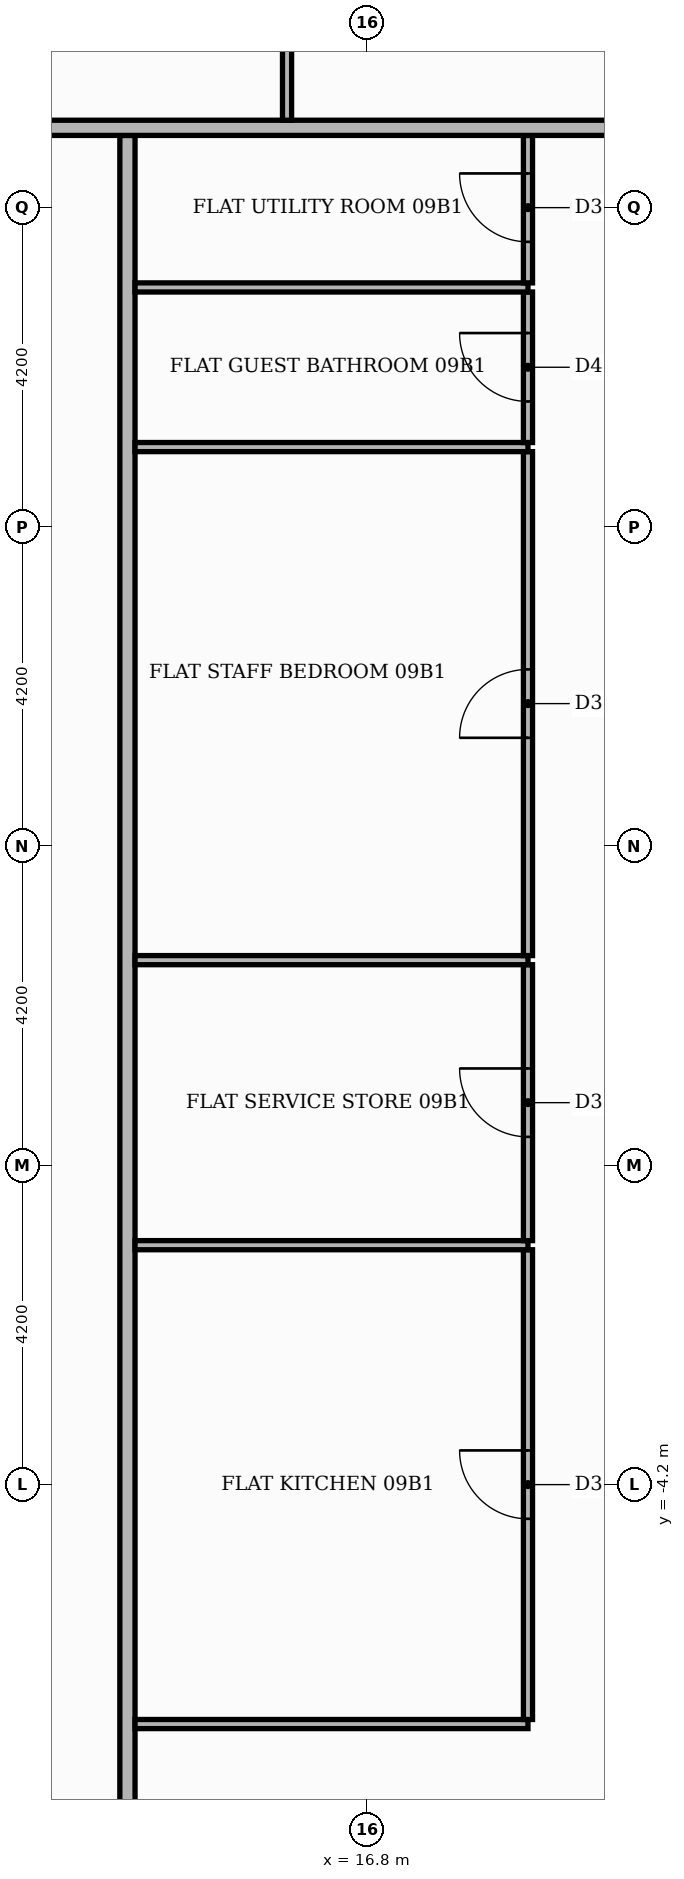
"""IFC4 building model, lengths in metres.
Left out: names, types, materials, properties, quantities, classifications, styles, units other than length and angle.
Written with IfcOpenShell. Run it as: python <this file> out.ifc"""

import sys

from ifc_helpers import new_model, si_unit, direction, frame, frame_2d, origin, place, context, subcontext, project, spatial, rectangle, extrude, element, fill, save


model = new_model("IFC4")
c1 = context("Model", 3, precision=1e-05, world=origin(), true_north=direction((0.0, 1.0)))
c2 = subcontext(c1, "Body", "Model", "MODEL_VIEW")
j1 = project(units=[si_unit("LENGTHUNIT", "METRE"), si_unit("PLANEANGLEUNIT", "RADIAN")], contexts=[c1])
p1 = place(None, origin())
s1 = spatial("IfcSite", under=j1, at=p1, CompositionType="ELEMENT")
p2 = place(p1, origin())
s2 = spatial("IfcBuilding", under=s1, at=p2, CompositionType="ELEMENT")
p3 = place(p2, frame((0.0, 0.0, 42.6)))
s3 = spatial("IfcBuildingStorey", under=s2, at=p3, CompositionType="ELEMENT", Elevation=42.6)
p4 = place(p3, frame((13.65, -13.55, 0.0), z_axis=(0.0, 0.0, 1.0), x_axis=(0.0, 1.0, 0.0)))
e1 = element("IfcWall", 1, at=p4, inside=s3, PredefinedType="PARTITIONING", context=c2, shape_type="SweptSolid", body=[
    extrude(rectangle(XDim=27.1, YDim=0.2, at=frame_2d((13.55, 0.0))), origin(), (0.0, 0.0, 1.0), 3.48),
])
p5 = place(p4, frame((2.5, 0.0, 0.0)))
e2 = element("IfcOpeningElement", 2, at=p5, cuts=e1, PredefinedType="OPENING", context=c2, shape_type="SweptSolid", body=[
    extrude(rectangle(XDim=1.1, YDim=2.4, at=frame_2d((0.55, 1.2))), frame((0.0, 0.11, 0.0), z_axis=(0.0, -1.0, 0.0), x_axis=(1.0, 0.0, 0.0)), (0.0, 0.0, 1.0), 0.22),
])
p6 = place(p3, frame((13.75, -7.35, 0.0), z_axis=(0.0, 0.0, 1.0), x_axis=(1.0, 0.0, 0.0)))
e3 = element("IfcWall", 3, at=p6, inside=s3, PredefinedType="PARTITIONING", context=c2, shape_type="SweptSolid", body=[
    extrude(rectangle(XDim=5.17, YDim=0.12, at=frame_2d((2.585, 0.0))), origin(), (0.0, 0.0, 1.0), 3.48),
])
p7 = place(p3, frame((18.92, -7.29, 0.0), z_axis=(0.0, 0.0, 1.0), x_axis=(0.0, 1.0, 0.0)))
e4 = element("IfcWall", 4, at=p7, inside=s3, PredefinedType="PARTITIONING", context=c2, shape_type="SweptSolid", body=[
    extrude(rectangle(XDim=6.18, YDim=0.12, at=frame_2d((3.09, 0.0))), origin(), (0.0, 0.0, 1.0), 3.48),
])
p8 = place(p7, frame((2.64, 0.0, 0.0)))
e5 = element("IfcOpeningElement", 5, at=p8, cuts=e4, PredefinedType="OPENING", context=c2, shape_type="SweptSolid", body=[
    extrude(rectangle(XDim=0.9, YDim=2.1, at=frame_2d((0.45, 1.05))), frame((0.0, 0.07, 0.0), z_axis=(0.0, -1.0, 0.0), x_axis=(1.0, 0.0, 0.0)), (0.0, 0.0, 1.0), 0.14),
])
p9 = place(p3, frame((13.75, -1.05, 0.0), z_axis=(0.0, 0.0, 1.0), x_axis=(1.0, 0.0, 0.0)))
e6 = element("IfcWall", 6, at=p9, inside=s3, PredefinedType="PARTITIONING", context=c2, shape_type="SweptSolid", body=[
    extrude(rectangle(XDim=5.17, YDim=0.12, at=frame_2d((2.585, 0.0))), origin(), (0.0, 0.0, 1.0), 3.48),
])
p10 = place(p3, frame((18.92, -0.99, 0.0), z_axis=(0.0, 0.0, 1.0), x_axis=(0.0, 1.0, 0.0)))
e7 = element("IfcWall", 7, at=p10, inside=s3, PredefinedType="PARTITIONING", context=c2, shape_type="SweptSolid", body=[
    extrude(rectangle(XDim=3.63, YDim=0.12, at=frame_2d((1.815, 0.0))), origin(), (0.0, 0.0, 1.0), 3.48),
])
p11 = place(p10, frame((1.365, 0.0, 0.0)))
e8 = element("IfcOpeningElement", 8, at=p11, cuts=e7, PredefinedType="OPENING", context=c2, shape_type="SweptSolid", body=[
    extrude(rectangle(XDim=0.9, YDim=2.1, at=frame_2d((0.45, 1.05))), frame((0.0, 0.07, 0.0), z_axis=(0.0, -1.0, 0.0), x_axis=(1.0, 0.0, 0.0)), (0.0, 0.0, 1.0), 0.14),
])
p12 = place(p3, frame((13.75, 2.7, 0.0), z_axis=(0.0, 0.0, 1.0), x_axis=(1.0, 0.0, 0.0)))
e9 = element("IfcWall", 9, at=p12, inside=s3, PredefinedType="PARTITIONING", context=c2, shape_type="SweptSolid", body=[
    extrude(rectangle(XDim=5.17, YDim=0.12, at=frame_2d((2.585, 0.0))), origin(), (0.0, 0.0, 1.0), 3.48),
])
p13 = place(p3, frame((18.92, 2.76, 0.0), z_axis=(0.0, 0.0, 1.0), x_axis=(0.0, 1.0, 0.0)))
e10 = element("IfcWall", 10, at=p13, inside=s3, PredefinedType="PARTITIONING", context=c2, shape_type="SweptSolid", body=[
    extrude(rectangle(XDim=6.63, YDim=0.12, at=frame_2d((3.315, 0.0))), origin(), (0.0, 0.0, 1.0), 3.48),
])
p14 = place(p13, frame((2.865, 0.0, 0.0)))
e11 = element("IfcOpeningElement", 11, at=p14, cuts=e10, PredefinedType="OPENING", context=c2, shape_type="SweptSolid", body=[
    extrude(rectangle(XDim=0.9, YDim=2.1, at=frame_2d((0.45, 1.05))), frame((0.0, 0.07, 0.0), z_axis=(0.0, -1.0, 0.0), x_axis=(1.0, 0.0, 0.0)), (0.0, 0.0, 1.0), 0.14),
])
p15 = place(p3, frame((13.75, 9.45, 0.0), z_axis=(0.0, 0.0, 1.0), x_axis=(1.0, 0.0, 0.0)))
e12 = element("IfcWall", 12, at=p15, inside=s3, PredefinedType="PARTITIONING", context=c2, shape_type="SweptSolid", body=[
    extrude(rectangle(XDim=5.17, YDim=0.12, at=frame_2d((2.585, 0.0))), origin(), (0.0, 0.0, 1.0), 3.48),
])
p16 = place(p3, frame((18.92, 9.51, 0.0), z_axis=(0.0, 0.0, 1.0), x_axis=(0.0, 1.0, 0.0)))
e13 = element("IfcWall", 13, at=p16, inside=s3, PredefinedType="PARTITIONING", context=c2, shape_type="SweptSolid", body=[
    extrude(rectangle(XDim=1.98, YDim=0.12, at=frame_2d((0.99, 0.0))), origin(), (0.0, 0.0, 1.0), 3.48),
])
p17 = place(p16, frame((0.54, 0.0, 0.0)))
e14 = element("IfcOpeningElement", 14, at=p17, cuts=e13, PredefinedType="OPENING", context=c2, shape_type="SweptSolid", body=[
    extrude(rectangle(XDim=0.9, YDim=2.1, at=frame_2d((0.45, 1.05))), frame((0.0, 0.07, 0.0), z_axis=(0.0, -1.0, 0.0), x_axis=(1.0, 0.0, 0.0)), (0.0, 0.0, 1.0), 0.14),
])
p18 = place(p3, frame((13.75, 11.55, 0.0), z_axis=(0.0, 0.0, 1.0), x_axis=(1.0, 0.0, 0.0)))
e15 = element("IfcWall", 15, at=p18, inside=s3, PredefinedType="PARTITIONING", context=c2, shape_type="SweptSolid", body=[
    extrude(rectangle(XDim=5.17, YDim=0.12, at=frame_2d((2.585, 0.0))), origin(), (0.0, 0.0, 1.0), 3.48),
])
p19 = place(p3, frame((18.92, 11.61, 0.0), z_axis=(0.0, 0.0, 1.0), x_axis=(0.0, 1.0, 0.0)))
e16 = element("IfcWall", 16, at=p19, inside=s3, PredefinedType="PARTITIONING", context=c2, shape_type="SweptSolid", body=[
    extrude(rectangle(XDim=1.94, YDim=0.12, at=frame_2d((0.97, 0.0))), origin(), (0.0, 0.0, 1.0), 3.48),
])
p20 = place(p19, frame((0.54, 0.0, 0.0)))
e17 = element("IfcOpeningElement", 17, at=p20, cuts=e16, PredefinedType="OPENING", context=c2, shape_type="SweptSolid", body=[
    extrude(rectangle(XDim=0.9, YDim=2.1, at=frame_2d((0.45, 1.05))), frame((0.0, 0.07, 0.0), z_axis=(0.0, -1.0, 0.0), x_axis=(1.0, 0.0, 0.0)), (0.0, 0.0, 1.0), 0.14),
])
p21 = place(p3, frame((-13.65, 13.65, 0.0), z_axis=(0.0, 0.0, 1.0), x_axis=(1.0, 0.0, 0.0)))
e18 = element("IfcWall", 18, at=p21, inside=s3, PredefinedType="PARTITIONING", context=c2, shape_type="SweptSolid", body=[
    extrude(rectangle(XDim=39.07, YDim=0.2, at=frame_2d((19.535, 0.0))), origin(), (0.0, 0.0, 1.0), 3.48),
])
p22 = place(p21, frame((24.65, 0.0, 0.0)))
e19 = element("IfcOpeningElement", 19, at=p22, cuts=e18, PredefinedType="OPENING", context=c2, shape_type="SweptSolid", body=[
    extrude(rectangle(XDim=1.1, YDim=2.4, at=frame_2d((0.55, 1.2))), frame((0.0, 0.11, 0.0), z_axis=(0.0, -1.0, 0.0), x_axis=(1.0, 0.0, 0.0)), (0.0, 0.0, 1.0), 0.22),
])
p23 = place(p21, frame((14.15, 0.0, 0.0)))
e20 = element("IfcOpeningElement", 20, at=p23, cuts=e18, PredefinedType="OPENING", context=c2, shape_type="SweptSolid", body=[
    extrude(rectangle(XDim=1.1, YDim=2.4, at=frame_2d((0.55, 1.2))), frame((0.0, 0.11, 0.0), z_axis=(0.0, -1.0, 0.0), x_axis=(1.0, 0.0, 0.0)), (0.0, 0.0, 1.0), 0.22),
])
p24 = place(p3, frame((15.75, 13.75, 0.0), z_axis=(0.0, 0.0, 1.0), x_axis=(0.0, 1.0, 0.0)))
e21 = element("IfcWall", 21, at=p24, inside=s3, PredefinedType="PARTITIONING", context=c2, shape_type="SweptSolid", body=[
    extrude(rectangle(XDim=6.31, YDim=0.12, at=frame_2d((3.155, 0.0))), origin(), (0.0, 0.0, 1.0), 3.48),
])
p25 = place(p24, frame((2.635, 0.0, 0.0)))
e22 = element("IfcOpeningElement", 22, at=p25, cuts=e21, PredefinedType="OPENING", context=c2, shape_type="SweptSolid", body=[
    extrude(rectangle(XDim=1.0, YDim=2.1, at=frame_2d((0.5, 1.05))), frame((0.0, 0.07, 0.0), z_axis=(0.0, -1.0, 0.0), x_axis=(1.0, 0.0, 0.0)), (0.0, 0.0, 1.0), 0.14),
])
p26 = place(p8, origin())
e23 = element("IfcDoor", 23, at=p26, inside=s3, OperationType="SINGLE_SWING_RIGHT", PredefinedType="DOOR", context=c2, shape_type="SweptSolid", body=[
    extrude(rectangle(XDim=0.9, YDim=2.1, at=frame_2d((0.45, 1.05))), frame((0.0, 0.025, 0.0), z_axis=(0.0, -1.0, 0.0), x_axis=(1.0, 0.0, 0.0)), (0.0, 0.0, 1.0), 0.05),
])
fill(e5, e23)
p27 = place(p11, origin())
e24 = element("IfcDoor", 24, at=p27, inside=s3, OperationType="SINGLE_SWING_RIGHT", PredefinedType="DOOR", context=c2, shape_type="SweptSolid", body=[
    extrude(rectangle(XDim=0.9, YDim=2.1, at=frame_2d((0.45, 1.05))), frame((0.0, 0.025, 0.0), z_axis=(0.0, -1.0, 0.0), x_axis=(1.0, 0.0, 0.0)), (0.0, 0.0, 1.0), 0.05),
])
fill(e8, e24)
p28 = place(p14, origin())
e25 = element("IfcDoor", 25, at=p28, inside=s3, OperationType="SINGLE_SWING_LEFT", PredefinedType="DOOR", context=c2, shape_type="SweptSolid", body=[
    extrude(rectangle(XDim=0.9, YDim=2.1, at=frame_2d((0.45, 1.05))), frame((0.0, 0.025, 0.0), z_axis=(0.0, -1.0, 0.0), x_axis=(1.0, 0.0, 0.0)), (0.0, 0.0, 1.0), 0.05),
])
fill(e11, e25)
p29 = place(p17, origin())
e26 = element("IfcDoor", 26, at=p29, inside=s3, OperationType="SINGLE_SWING_RIGHT", PredefinedType="DOOR", context=c2, shape_type="SweptSolid", body=[
    extrude(rectangle(XDim=0.9, YDim=2.1, at=frame_2d((0.45, 1.05))), frame((0.0, 0.025, 0.0), z_axis=(0.0, -1.0, 0.0), x_axis=(1.0, 0.0, 0.0)), (0.0, 0.0, 1.0), 0.05),
])
fill(e14, e26)
p30 = place(p20, origin())
e27 = element("IfcDoor", 27, at=p30, inside=s3, OperationType="SINGLE_SWING_RIGHT", PredefinedType="DOOR", context=c2, shape_type="SweptSolid", body=[
    extrude(rectangle(XDim=0.9, YDim=2.1, at=frame_2d((0.45, 1.05))), frame((0.0, 0.025, 0.0), z_axis=(0.0, -1.0, 0.0), x_axis=(1.0, 0.0, 0.0)), (0.0, 0.0, 1.0), 0.05),
])
fill(e17, e27)
save(model, sys.argv[1])
